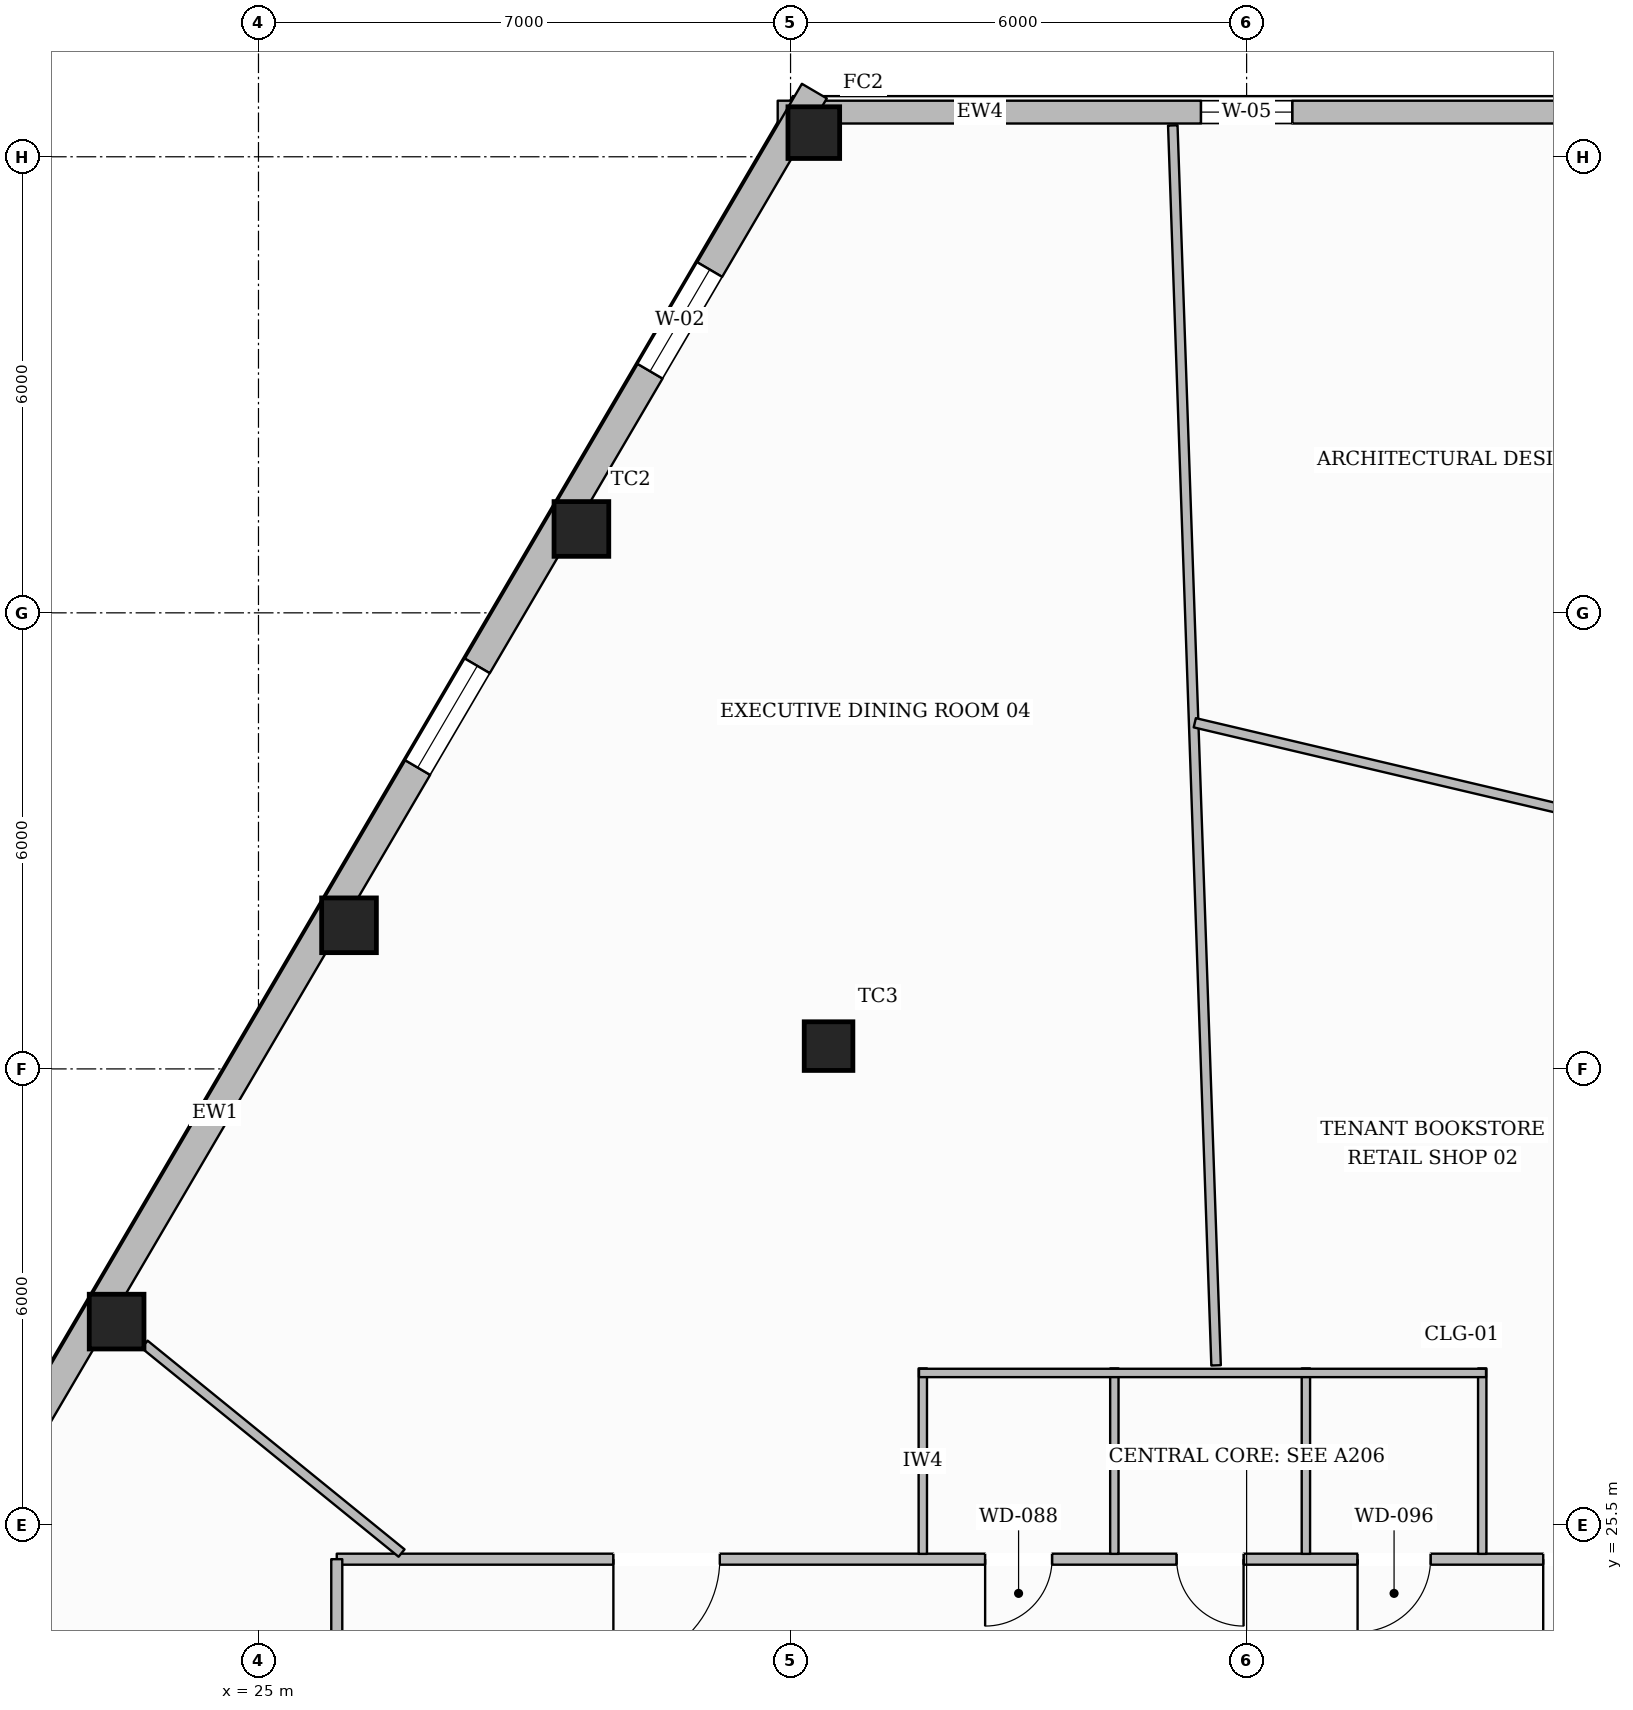
"""IFC4 building model, lengths in metres.
Left out: names, types, materials, properties, quantities, classifications, styles, units other than length and angle.
Written with IfcOpenShell. Run it as: python <this file> out.ifc"""

import sys

from ifc_helpers import new_model, si_unit, direction, frame, frame_2d, origin, origin_2d, place, context, subcontext, project, spatial, rectangle, hollow_rectangle, extrude, element, fill, save


model = new_model("IFC4")
c1 = context("Model", 3, precision=1e-05, world=origin(), true_north=direction((0.0, 1.0)))
c2 = subcontext(c1, "Body", "Model", "MODEL_VIEW")
j1 = project(units=[si_unit("LENGTHUNIT", "METRE"), si_unit("PLANEANGLEUNIT", "RADIAN")], contexts=[c1])
p1 = place(None, origin())
s1 = spatial("IfcSite", under=j1, at=p1, CompositionType="ELEMENT")
p2 = place(p1, origin())
s2 = spatial("IfcBuilding", under=s1, at=p2, CompositionType="ELEMENT")
p3 = place(p2, frame((0.0, 0.0, 131.7)))
s3 = spatial("IfcBuildingStorey", under=s2, at=p3, CompositionType="ELEMENT", Elevation=131.7)
p4 = place(p3, frame((32.306, 43.818, 0.0), z_axis=(0.0, 0.0, 1.0), x_axis=(1.0, 0.0, 0.0)))
e1 = element("IfcColumn", 1, at=p4, inside=s3, PredefinedType="COLUMN", context=c2, shape_type="SweptSolid", body=[
    extrude(hollow_rectangle(XDim=0.68, YDim=0.68, WallThickness=0.03, at=origin_2d()), origin(), (0.0, 0.0, 1.0), 3.6),
])
for number, where, z_axis, x_axis in (
    (2, (29.249, 38.604, 0.0), (0.0, 0.0, 1.0), (1.0, 0.0, 0.0)),
    (3, (26.191, 33.389, 0.0), (0.0, 0.0, 1.0), (1.0, 0.0, 0.0)),
    (4, (23.134, 28.176, 0.0), (0.0, 0.0, 1.0), (1.0, 0.0, 0.0)),
):
    element("IfcColumn", number, at=place(p3, frame(where, z_axis=z_axis, x_axis=x_axis)), inside=s3, PredefinedType="COLUMN", context=c2, shape_type="SweptSolid", body=[
        extrude(hollow_rectangle(XDim=0.72, YDim=0.72, WallThickness=0.032, at=origin_2d()), origin(), (0.0, 0.0, 1.0), 3.6),
    ])
p5 = place(p3, frame((32.5, 31.8, 0.0), z_axis=(0.0, 0.0, 1.0), x_axis=(1.0, 0.0, 0.0)))
e5 = element("IfcColumn", 5, at=p5, inside=s3, PredefinedType="COLUMN", context=c2, shape_type="SweptSolid", body=[
    extrude(hollow_rectangle(XDim=0.64, YDim=0.64, WallThickness=0.028, at=origin_2d()), origin(), (0.0, 0.0, 1.0), 3.6),
])
p6 = place(p3, frame((31.831, 44.088, 0.0), z_axis=(0.0, 0.0, 1.0), x_axis=(1.0, 0.0, 0.0)))
e6 = element("IfcWall", 6, at=p6, inside=s3, PredefinedType="STANDARD", context=c2, shape_type="SweptSolid", body=[
    extrude(rectangle(XDim=12.338, YDim=0.3, at=frame_2d((6.169, 0.0))), origin(), (0.0, 0.0, 1.0), 3.059),
])
p7 = place(p6, frame((5.569, 0.0, 0.65)))
e7 = element("IfcOpeningElement", 7, at=p7, cuts=e6, PredefinedType="OPENING", context=c2, shape_type="SweptSolid", body=[
    extrude(rectangle(XDim=1.2, YDim=1.7, at=frame_2d((0.6, 0.85))), frame((0.0, 0.16, 0.0), z_axis=(0.0, -1.0, 0.0), x_axis=(1.0, 0.0, 0.0)), (0.0, 0.0, 1.0), 0.32),
])
p8 = place(p3, frame((13.485, 12.254, 0.0), z_axis=(0.0, 0.0, 1.0), x_axis=(0.505829244079, 0.862633627813, 0.0)))
e8 = element("IfcWall", 8, at=p8, inside=s3, PredefinedType="STANDARD", context=c2, shape_type="SweptSolid", body=[
    extrude(rectangle(XDim=37.223, YDim=0.38, at=frame_2d((18.611, 0.0))), origin(), (0.0, 0.0, 1.0), 3.059),
])
p9 = place(p8, frame((32.951, 0.0, 0.65)))
e9 = element("IfcOpeningElement", 9, at=p9, cuts=e8, PredefinedType="OPENING", context=c2, shape_type="SweptSolid", body=[
    extrude(rectangle(XDim=1.55, YDim=1.75, at=frame_2d((0.775, 0.875))), frame((0.0, 0.2, 0.0), z_axis=(0.0, -1.0, 0.0), x_axis=(1.0, 0.0, 0.0)), (0.0, 0.0, 1.0), 0.4),
])
p10 = place(p8, frame((26.906, 0.0, 0.65)))
e10 = element("IfcOpeningElement", 10, at=p10, cuts=e8, PredefinedType="OPENING", context=c2, shape_type="SweptSolid", body=[
    extrude(rectangle(XDim=1.55, YDim=1.75, at=frame_2d((0.775, 0.875))), frame((0.0, 0.2, 0.0), z_axis=(0.0, -1.0, 0.0), x_axis=(1.0, 0.0, 0.0)), (0.0, 0.0, 1.0), 0.4),
])
p11 = place(p8, frame((14.817, 0.0, 0.65)))
e11 = element("IfcOpeningElement", 11, at=p11, cuts=e8, PredefinedType="OPENING", context=c2, shape_type="SweptSolid", body=[
    extrude(rectangle(XDim=1.55, YDim=1.75, at=frame_2d((0.775, 0.875))), frame((0.0, 0.2, 0.0), z_axis=(0.0, -1.0, 0.0), x_axis=(1.0, 0.0, 0.0)), (0.0, 0.0, 1.0), 0.4),
])
p12 = place(p8, frame((8.773, 0.0, 0.65)))
e12 = element("IfcOpeningElement", 12, at=p12, cuts=e8, PredefinedType="OPENING", context=c2, shape_type="SweptSolid", body=[
    extrude(rectangle(XDim=1.55, YDim=1.75, at=frame_2d((0.775, 0.875))), frame((0.0, 0.2, 0.0), z_axis=(0.0, -1.0, 0.0), x_axis=(1.0, 0.0, 0.0)), (0.0, 0.0, 1.0), 0.4),
])
p13 = place(p8, frame((2.729, 0.0, 0.65)))
e13 = element("IfcOpeningElement", 13, at=p13, cuts=e8, PredefinedType="OPENING", context=c2, shape_type="SweptSolid", body=[
    extrude(rectangle(XDim=1.55, YDim=1.75, at=frame_2d((0.775, 0.875))), frame((0.0, 0.2, 0.0), z_axis=(0.0, -1.0, 0.0), x_axis=(1.0, 0.0, 0.0)), (0.0, 0.0, 1.0), 0.4),
])
p14 = place(p3, frame((49.97, 25.05, 0.0), z_axis=(0.0, 0.0, 1.0), x_axis=(-1.0, 0.0, 0.0)))
e14 = element("IfcWall", 14, at=p14, inside=s3, PredefinedType="PARTITIONING", context=c2, shape_type="SweptSolid", body=[
    extrude(rectangle(XDim=23.94, YDim=0.145, at=frame_2d((11.97, 0.0))), origin(), (0.0, 0.0, 1.0), 3.6),
])
p15 = place(p14, frame((14.53, 0.0, 0.0)))
e15 = element("IfcOpeningElement", 15, at=p15, cuts=e14, PredefinedType="OPENING", context=c2, shape_type="SweptSolid", body=[
    extrude(rectangle(XDim=0.88, YDim=2.1, at=frame_2d((0.44, 1.05))), frame((0.0, 0.083, 0.0), z_axis=(0.0, -1.0, 0.0), x_axis=(1.0, 0.0, 0.0)), (0.0, 0.0, 1.0), 0.165),
])
p16 = place(p14, frame((12.01, 0.0, 0.0)))
e16 = element("IfcOpeningElement", 16, at=p16, cuts=e14, PredefinedType="OPENING", context=c2, shape_type="SweptSolid", body=[
    extrude(rectangle(XDim=0.88, YDim=2.1, at=frame_2d((0.44, 1.05))), frame((0.0, 0.083, 0.0), z_axis=(0.0, -1.0, 0.0), x_axis=(1.0, 0.0, 0.0)), (0.0, 0.0, 1.0), 0.165),
])
p17 = place(p14, frame((9.55, 0.0, 0.0)))
e17 = element("IfcOpeningElement", 17, at=p17, cuts=e14, PredefinedType="OPENING", context=c2, shape_type="SweptSolid", body=[
    extrude(rectangle(XDim=0.96, YDim=2.1, at=frame_2d((0.48, 1.05))), frame((0.0, 0.083, 0.0), z_axis=(0.0, -1.0, 0.0), x_axis=(1.0, 0.0, 0.0)), (0.0, 0.0, 1.0), 0.165),
])
p18 = place(p14, frame((2.292, 0.0, 0.0)))
e18 = element("IfcOpeningElement", 18, at=p18, cuts=e14, PredefinedType="OPENING", context=c2, shape_type="SweptSolid", body=[
    extrude(rectangle(XDim=0.98, YDim=2.15, at=frame_2d((0.49, 1.075))), frame((0.0, 0.083, 0.0), z_axis=(0.0, -1.0, 0.0), x_axis=(1.0, 0.0, 0.0)), (0.0, 0.0, 1.0), 0.165),
])
p19 = place(p14, frame((6.668, 0.0, 0.0)))
e19 = element("IfcOpeningElement", 19, at=p19, cuts=e14, PredefinedType="OPENING", context=c2, shape_type="SweptSolid", body=[
    extrude(rectangle(XDim=1.4, YDim=2.2, at=frame_2d((0.7, 1.1))), frame((0.0, 0.083, 0.0), z_axis=(0.0, -1.0, 0.0), x_axis=(1.0, 0.0, 0.0)), (0.0, 0.0, 1.0), 0.165),
])
p20 = place(p14, frame((18.901, 0.0, 0.0)))
e20 = element("IfcOpeningElement", 20, at=p20, cuts=e14, PredefinedType="OPENING", context=c2, shape_type="SweptSolid", body=[
    extrude(rectangle(XDim=1.4, YDim=2.2, at=frame_2d((0.7, 1.1))), frame((0.0, 0.083, 0.0), z_axis=(0.0, -1.0, 0.0), x_axis=(1.0, 0.0, 0.0)), (0.0, 0.0, 1.0), 0.165),
])
p21 = place(p3, frame((26.03, 25.05, 0.0), z_axis=(0.0, 0.0, 1.0), x_axis=(0.0, -1.0, 0.0)))
e21 = element("IfcWall", 21, at=p21, inside=s3, PredefinedType="PARTITIONING", context=c2, shape_type="SweptSolid", body=[
    extrude(rectangle(XDim=17.9, YDim=0.145, at=frame_2d((8.95, 0.0))), origin(), (0.0, 0.0, 1.0), 3.288),
])
p22 = place(p21, frame((3.597, 0.0, 0.0)))
e22 = element("IfcOpeningElement", 22, at=p22, cuts=e21, PredefinedType="OPENING", context=c2, shape_type="SweptSolid", body=[
    extrude(rectangle(XDim=0.98, YDim=2.15, at=frame_2d((0.49, 1.075))), frame((0.0, 0.083, 0.0), z_axis=(0.0, -1.0, 0.0), x_axis=(1.0, 0.0, 0.0)), (0.0, 0.0, 1.0), 0.165),
])
p23 = place(p21, frame((12.103, 0.0, 0.0)))
e23 = element("IfcOpeningElement", 23, at=p23, cuts=e21, PredefinedType="OPENING", context=c2, shape_type="SweptSolid", body=[
    extrude(rectangle(XDim=1.4, YDim=2.2, at=frame_2d((0.7, 1.1))), frame((0.0, 0.083, 0.0), z_axis=(0.0, -1.0, 0.0), x_axis=(1.0, 0.0, 0.0)), (0.0, 0.0, 1.0), 0.165),
])
for number, where, z_axis, x_axis in (
    (24, (33.74, 25.12, 0.0), (0.0, 0.0, 1.0), (0.0, 1.0, 0.0)),
    (25, (36.26, 25.12, 0.0), (0.0, 0.0, 1.0), (0.0, 1.0, 0.0)),
    (26, (38.78, 25.12, 0.0), (0.0, 0.0, 1.0), (0.0, 1.0, 0.0)),
    (27, (41.1, 25.12, 0.0), (0.0, 0.0, 1.0), (0.0, 1.0, 0.0)),
):
    element("IfcWall", number, at=place(p3, frame(where, z_axis=z_axis, x_axis=x_axis)), inside=s3, PredefinedType="PLUMBINGWALL", context=c2, shape_type="SweptSolid", body=[
        extrude(rectangle(XDim=2.44, YDim=0.11, at=frame_2d((1.22, 0.0))), origin(), (0.0, 0.0, 1.0), 3.6),
    ])
p24 = place(p3, frame((33.69, 27.5, 0.0), z_axis=(0.0, 0.0, 1.0), x_axis=(1.0, 0.0, 0.0)))
e28 = element("IfcWall", 28, at=p24, inside=s3, PredefinedType="PLUMBINGWALL", context=c2, shape_type="SweptSolid", body=[
    extrude(rectangle(XDim=7.46, YDim=0.11, at=frame_2d((3.73, 0.0))), origin(), (0.0, 0.0, 1.0), 3.6),
])
p25 = place(p3, frame((37.598, 27.6, 0.0), z_axis=(0.0, 0.0, 1.0), x_axis=(-0.034895520883, 0.99939096585, 0.0)))
e29 = element("IfcWall", 29, at=p25, inside=s3, PredefinedType="PARTITIONING", context=c2, shape_type="SweptSolid", body=[
    extrude(rectangle(XDim=16.323, YDim=0.125, at=frame_2d((8.161, 0.0))), origin(), (0.0, 0.0, 1.0), 3.6),
])
p26 = place(p3, frame((26.882, 25.131, 0.0), z_axis=(0.0, 0.0, 1.0), x_axis=(-0.776187723066, 0.630501878317, 0.0)))
e30 = element("IfcWall", 30, at=p26, inside=s3, PredefinedType="PARTITIONING", context=c2, shape_type="SweptSolid", body=[
    extrude(rectangle(XDim=4.355, YDim=0.125, at=frame_2d((2.178, 0.0))), origin(), (0.0, 0.0, 1.0), 3.141),
])
p27 = place(p3, frame((49.441, 33.199, 0.0), z_axis=(0.0, 0.0, 1.0), x_axis=(-0.973375761663, 0.229215240784, 0.0)))
e31 = element("IfcWall", 31, at=p27, inside=s3, PredefinedType="PARTITIONING", context=c2, shape_type="SweptSolid", body=[
    extrude(rectangle(XDim=12.454, YDim=0.125, at=frame_2d((6.227, 0.0))), origin(), (0.0, 0.0, 1.0), 3.6),
])
p28 = place(p27, frame((5.63, 0.0, 0.0)))
e32 = element("IfcOpeningElement", 32, at=p28, cuts=e31, PredefinedType="OPENING", context=c2, shape_type="SweptSolid", body=[
    extrude(rectangle(XDim=0.98, YDim=2.15, at=frame_2d((0.49, 1.075))), frame((0.0, 0.073, 0.0), z_axis=(0.0, -1.0, 0.0), x_axis=(1.0, 0.0, 0.0)), (0.0, 0.0, 1.0), 0.145),
])
p29 = place(p9, origin())
e33 = element("IfcWindow", 33, at=p29, inside=s3, PartitioningType="SINGLE_PANEL", PredefinedType="WINDOW", context=c2, shape_type="SweptSolid", body=[
    extrude(rectangle(XDim=1.55, YDim=1.75, at=frame_2d((0.775, 0.875))), frame((0.0, 0.03, 0.0), z_axis=(0.0, -1.0, 0.0), x_axis=(1.0, 0.0, 0.0)), (0.0, 0.0, 1.0), 0.06),
])
fill(e9, e33)
p30 = place(p10, origin())
e34 = element("IfcWindow", 34, at=p30, inside=s3, PartitioningType="SINGLE_PANEL", PredefinedType="WINDOW", context=c2, shape_type="SweptSolid", body=[
    extrude(rectangle(XDim=1.55, YDim=1.75, at=frame_2d((0.775, 0.875))), frame((0.0, 0.03, 0.0), z_axis=(0.0, -1.0, 0.0), x_axis=(1.0, 0.0, 0.0)), (0.0, 0.0, 1.0), 0.06),
])
fill(e10, e34)
p31 = place(p7, origin())
e35 = element("IfcWindow", 35, at=p31, inside=s3, PartitioningType="SINGLE_PANEL", PredefinedType="WINDOW", context=c2, shape_type="SweptSolid", body=[
    extrude(rectangle(XDim=1.2, YDim=1.7, at=frame_2d((0.6, 0.85))), frame((0.0, 0.03, 0.0), z_axis=(0.0, -1.0, 0.0), x_axis=(1.0, 0.0, 0.0)), (0.0, 0.0, 1.0), 0.06),
])
fill(e7, e35)
p32 = place(p15, origin())
e36 = element("IfcDoor", 36, at=p32, inside=s3, OperationType="SINGLE_SWING_RIGHT", PredefinedType="DOOR", context=c2, shape_type="SweptSolid", body=[
    extrude(rectangle(XDim=0.88, YDim=2.1, at=frame_2d((0.44, 1.05))), frame((0.0, 0.025, 0.0), z_axis=(0.0, -1.0, 0.0), x_axis=(1.0, 0.0, 0.0)), (0.0, 0.0, 1.0), 0.05),
])
fill(e15, e36)
p33 = place(p16, origin())
e37 = element("IfcDoor", 37, at=p33, inside=s3, OperationType="SINGLE_SWING_LEFT", PredefinedType="DOOR", context=c2, shape_type="SweptSolid", body=[
    extrude(rectangle(XDim=0.88, YDim=2.1, at=frame_2d((0.44, 1.05))), frame((0.0, 0.025, 0.0), z_axis=(0.0, -1.0, 0.0), x_axis=(1.0, 0.0, 0.0)), (0.0, 0.0, 1.0), 0.05),
])
fill(e16, e37)
p34 = place(p17, origin())
e38 = element("IfcDoor", 38, at=p34, inside=s3, OperationType="SINGLE_SWING_RIGHT", PredefinedType="DOOR", context=c2, shape_type="SweptSolid", body=[
    extrude(rectangle(XDim=0.96, YDim=2.1, at=frame_2d((0.48, 1.05))), frame((0.0, 0.025, 0.0), z_axis=(0.0, -1.0, 0.0), x_axis=(1.0, 0.0, 0.0)), (0.0, 0.0, 1.0), 0.05),
])
fill(e17, e38)
p35 = place(p19, origin())
e39 = element("IfcDoor", 39, at=p35, inside=s3, OperationType="SINGLE_SWING_RIGHT", PredefinedType="DOOR", context=c2, shape_type="SweptSolid", body=[
    extrude(rectangle(XDim=1.4, YDim=2.2, at=frame_2d((0.7, 1.1))), frame((0.0, 0.025, 0.0), z_axis=(0.0, -1.0, 0.0), x_axis=(1.0, 0.0, 0.0)), (0.0, 0.0, 1.0), 0.05),
])
fill(e19, e39)
p36 = place(p20, origin())
e40 = element("IfcDoor", 40, at=p36, inside=s3, OperationType="SINGLE_SWING_RIGHT", PredefinedType="DOOR", context=c2, shape_type="SweptSolid", body=[
    extrude(rectangle(XDim=1.4, YDim=2.2, at=frame_2d((0.7, 1.1))), frame((0.0, 0.025, 0.0), z_axis=(0.0, -1.0, 0.0), x_axis=(1.0, 0.0, 0.0)), (0.0, 0.0, 1.0), 0.05),
])
fill(e20, e40)
save(model, sys.argv[1])
